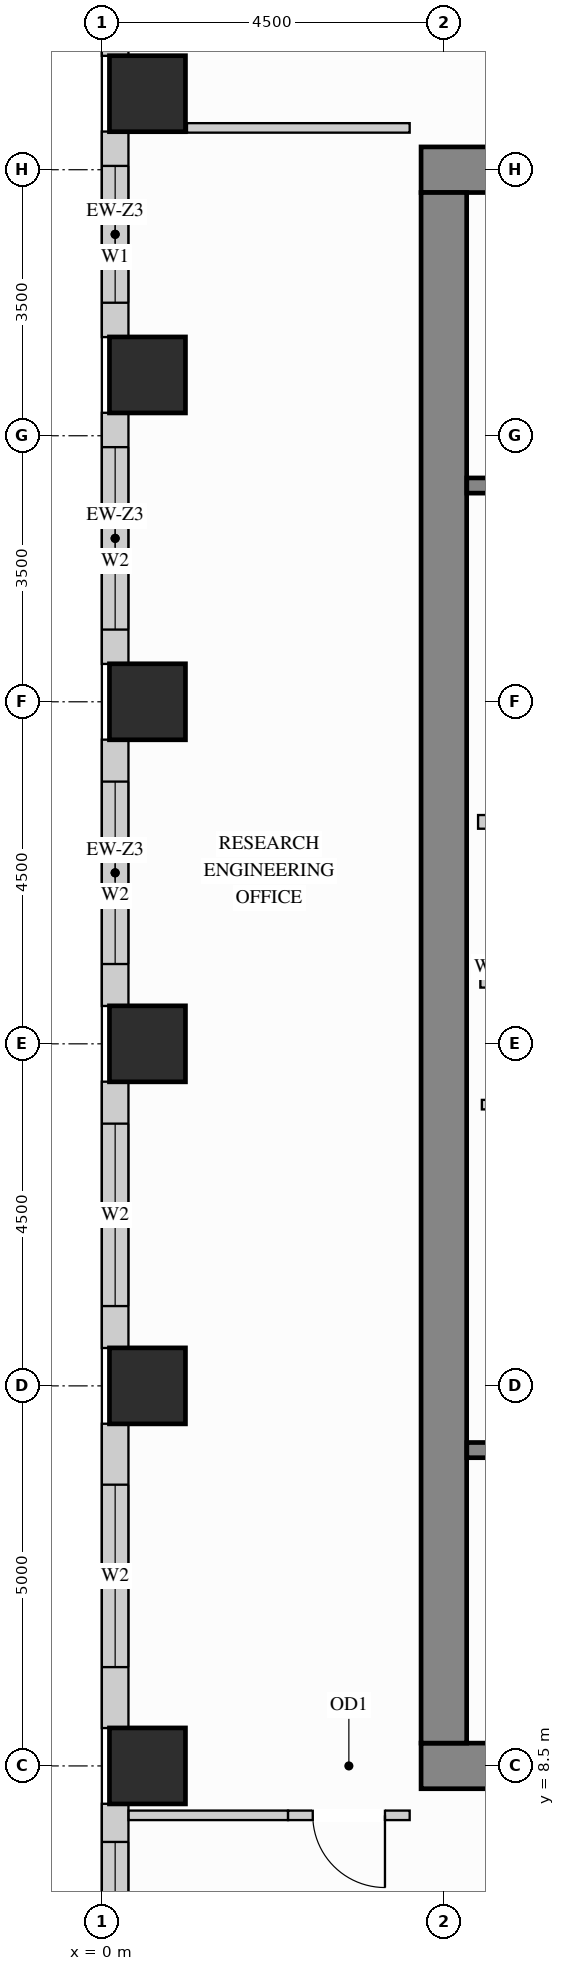
"""IFC4 building model, lengths in metres.
Left out: names, types, materials, properties, quantities, classifications, styles, units other than length and angle.
Written with IfcOpenShell. Run it as: python <this file> out.ifc"""

import sys

from ifc_helpers import new_model, si_unit, direction, frame, frame_2d, origin, origin_2d, place, context, subcontext, project, spatial, rectangle, extrude, source, transform, mapped, element, fill, save


model = new_model("IFC4")
c1 = context("Model", 3, precision=1e-05, world=origin(), true_north=direction((0.0, 1.0)))
c2 = subcontext(c1, "Body", "Model", "MODEL_VIEW")
j1 = project(units=[si_unit("LENGTHUNIT", "METRE"), si_unit("PLANEANGLEUNIT", "RADIAN")], contexts=[c1])
p1 = place(None, origin())
s1 = spatial("IfcSite", under=j1, at=p1, CompositionType="ELEMENT")
p2 = place(p1, origin())
s2 = spatial("IfcBuilding", under=s1, at=p2, CompositionType="ELEMENT")
p3 = place(p2, frame((0.0, 0.0, 186.3)))
s3 = spatial("IfcBuildingStorey", under=s2, at=p3, CompositionType="ELEMENT", Elevation=186.3)
m1 = source(origin(), c2, "Body", "SweptSolid", [
    extrude(rectangle(XDim=1.0, YDim=1.0, at=origin_2d()), origin(), (0.0, 0.0, 1.0), 3.4),
])
for number, where, z_axis, x_axis in (
    (1, (0.6, 13.5, 0.0), (0.0, 0.0, 1.0), (1.0, 0.0, 0.0)),
    (2, (0.6, 18.0, 0.0), (0.0, 0.0, 1.0), (1.0, 0.0, 0.0)),
    (3, (0.6, 22.5, 0.0), (0.0, 0.0, 1.0), (1.0, 0.0, 0.0)),
    (4, (0.6, 26.8, 0.0), (0.0, 0.0, 1.0), (1.0, 0.0, 0.0)),
    (5, (0.6, 30.5, 0.0), (0.0, 0.0, 1.0), (1.0, 0.0, 0.0)),
    (6, (0.6, 8.5, 0.0), (0.0, 0.0, 1.0), (1.0, 0.0, 0.0)),
):
    element("IfcColumn", number, at=place(p3, frame(where, z_axis=z_axis, x_axis=x_axis)), inside=s3, PredefinedType="COLUMN", context=c2, shape_type="MappedRepresentation", body=[
        mapped(m1, transform((0.0, 0.0, 0.0), x_axis=(1.0, 0.0, 0.0), y_axis=(0.0, 1.0, 0.0), z_axis=(0.0, 0.0, 1.0))),
    ])
m2 = source(origin(), c2, "Body", "SweptSolid", [
    extrude(rectangle(XDim=10.6, YDim=0.6, at=frame_2d((5.3, 0.0))), origin(), (0.0, 0.0, 1.0), 3.4),
])
for number, where, z_axis, x_axis in (
    (7, (4.2, 29.5, 0.0), (0.0, 0.0, 1.0), (1.0, 0.0, 0.0)),
    (8, (4.2, 8.5, 0.0), (0.0, 0.0, 1.0), (1.0, 0.0, 0.0)),
):
    element("IfcWall", number, at=place(p3, frame(where, z_axis=z_axis, x_axis=x_axis)), inside=s3, PredefinedType="SHEAR", context=c2, shape_type="MappedRepresentation", body=[
        mapped(m2, transform((0.0, 0.0, 0.0), x_axis=(1.0, 0.0, 0.0), y_axis=(0.0, 1.0, 0.0), z_axis=(0.0, 0.0, 1.0))),
    ])
m3 = source(origin(), c2, "Body", "SweptSolid", [
    extrude(rectangle(XDim=20.4, YDim=0.6, at=frame_2d((10.2, 0.0))), origin(), (0.0, 0.0, 1.0), 3.4),
])
p4 = place(p3, frame((4.5, 8.8, 0.0), z_axis=(0.0, 0.0, 1.0), x_axis=(0.0, 1.0, 0.0)))
e9 = element("IfcWall", 9, at=p4, inside=s3, PredefinedType="SHEAR", context=c2, shape_type="MappedRepresentation", body=[
    mapped(m3, transform((0.0, 0.0, 0.0), x_axis=(1.0, 0.0, 0.0), y_axis=(0.0, 1.0, 0.0), z_axis=(0.0, 0.0, 1.0))),
])
p5 = place(p3, frame((0.175, 34.502, 0.0), z_axis=(0.0, 0.0, 1.0), x_axis=(0.0, -1.0, 0.0)))
e10 = element("IfcWall", 10, at=p5, inside=s3, PredefinedType="SOLIDWALL", context=c2, shape_type="SweptSolid", body=[
    extrude(rectangle(XDim=3.504, YDim=0.35, at=frame_2d((1.752, 0.0))), origin(), (0.0, 0.0, 1.0), 2.612),
])
p6 = place(p5, frame((0.511, 0.0, 0.78)))
e11 = element("IfcOpeningElement", 11, at=p6, cuts=e10, PredefinedType="OPENING", context=c2, shape_type="SweptSolid", body=[
    extrude(rectangle(XDim=1.2, YDim=1.652, at=frame_2d((0.6, 0.826))), frame((0.0, 0.185, 0.0), z_axis=(0.0, -1.0, 0.0), x_axis=(1.0, 0.0, 0.0)), (0.0, 0.0, 1.0), 0.37),
])
p7 = place(p3, frame((0.175, 30.002, 0.0), z_axis=(0.0, 0.0, 1.0), x_axis=(0.0, -1.0, 0.0)))
e12 = element("IfcWall", 12, at=p7, inside=s3, PredefinedType="SOLIDWALL", context=c2, shape_type="SweptSolid", body=[
    extrude(rectangle(XDim=2.704, YDim=0.35, at=frame_2d((1.352, 0.0))), origin(), (0.0, 0.0, 1.0), 2.612),
])
p8 = place(p7, frame((0.452, 0.0, 0.78)))
e13 = element("IfcOpeningElement", 13, at=p8, cuts=e12, PredefinedType="OPENING", context=c2, shape_type="SweptSolid", body=[
    extrude(rectangle(XDim=1.8, YDim=1.652, at=frame_2d((0.9, 0.826))), frame((0.0, 0.185, 0.0), z_axis=(0.0, -1.0, 0.0), x_axis=(1.0, 0.0, 0.0)), (0.0, 0.0, 1.0), 0.37),
])
p9 = place(p3, frame((0.175, 26.302, 0.0), z_axis=(0.0, 0.0, 1.0), x_axis=(0.0, -1.0, 0.0)))
e14 = element("IfcWall", 14, at=p9, inside=s3, PredefinedType="SOLIDWALL", context=c2, shape_type="SweptSolid", body=[
    extrude(rectangle(XDim=3.304, YDim=0.35, at=frame_2d((1.652, 0.0))), origin(), (0.0, 0.0, 1.0), 2.612),
])
p10 = place(p9, frame((0.452, 0.0, 0.78)))
e15 = element("IfcOpeningElement", 15, at=p10, cuts=e14, PredefinedType="OPENING", context=c2, shape_type="SweptSolid", body=[
    extrude(rectangle(XDim=2.4, YDim=1.652, at=frame_2d((1.2, 0.826))), frame((0.0, 0.185, 0.0), z_axis=(0.0, -1.0, 0.0), x_axis=(1.0, 0.0, 0.0)), (0.0, 0.0, 1.0), 0.37),
])
p11 = place(p3, frame((0.175, 22.002, 0.0), z_axis=(0.0, 0.0, 1.0), x_axis=(0.0, -1.0, 0.0)))
e16 = element("IfcWall", 16, at=p11, inside=s3, PredefinedType="SOLIDWALL", context=c2, shape_type="SweptSolid", body=[
    extrude(rectangle(XDim=3.504, YDim=0.35, at=frame_2d((1.752, 0.0))), origin(), (0.0, 0.0, 1.0), 2.612),
])
p12 = place(p11, frame((0.552, 0.0, 0.78)))
e17 = element("IfcOpeningElement", 17, at=p12, cuts=e16, PredefinedType="OPENING", context=c2, shape_type="SweptSolid", body=[
    extrude(rectangle(XDim=2.4, YDim=1.652, at=frame_2d((1.2, 0.826))), frame((0.0, 0.185, 0.0), z_axis=(0.0, -1.0, 0.0), x_axis=(1.0, 0.0, 0.0)), (0.0, 0.0, 1.0), 0.37),
])
p13 = place(p3, frame((0.175, 17.502, 0.0), z_axis=(0.0, 0.0, 1.0), x_axis=(0.0, -1.0, 0.0)))
e18 = element("IfcWall", 18, at=p13, inside=s3, PredefinedType="SOLIDWALL", context=c2, shape_type="SweptSolid", body=[
    extrude(rectangle(XDim=3.504, YDim=0.35, at=frame_2d((1.752, 0.0))), origin(), (0.0, 0.0, 1.0), 2.612),
])
p14 = place(p13, frame((0.552, 0.0, 0.78)))
e19 = element("IfcOpeningElement", 19, at=p14, cuts=e18, PredefinedType="OPENING", context=c2, shape_type="SweptSolid", body=[
    extrude(rectangle(XDim=2.4, YDim=1.652, at=frame_2d((1.2, 0.826))), frame((0.0, 0.185, 0.0), z_axis=(0.0, -1.0, 0.0), x_axis=(1.0, 0.0, 0.0)), (0.0, 0.0, 1.0), 0.37),
])
p15 = place(p3, frame((0.175, 13.002, 0.0), z_axis=(0.0, 0.0, 1.0), x_axis=(0.0, -1.0, 0.0)))
e20 = element("IfcWall", 20, at=p15, inside=s3, PredefinedType="SOLIDWALL", context=c2, shape_type="SweptSolid", body=[
    extrude(rectangle(XDim=4.004, YDim=0.35, at=frame_2d((2.002, 0.0))), origin(), (0.0, 0.0, 1.0), 2.612),
])
p16 = place(p15, frame((0.802, 0.0, 0.78)))
e21 = element("IfcOpeningElement", 21, at=p16, cuts=e20, PredefinedType="OPENING", context=c2, shape_type="SweptSolid", body=[
    extrude(rectangle(XDim=2.4, YDim=1.652, at=frame_2d((1.2, 0.826))), frame((0.0, 0.185, 0.0), z_axis=(0.0, -1.0, 0.0), x_axis=(1.0, 0.0, 0.0)), (0.0, 0.0, 1.0), 0.37),
])
p17 = place(p3, frame((0.175, 8.002, 0.0), z_axis=(0.0, 0.0, 1.0), x_axis=(0.0, -1.0, 0.0)))
e22 = element("IfcWall", 22, at=p17, inside=s3, PredefinedType="SOLIDWALL", context=c2, shape_type="SweptSolid", body=[
    extrude(rectangle(XDim=4.004, YDim=0.35, at=frame_2d((2.002, 0.0))), origin(), (0.0, 0.0, 1.0), 2.612),
])
p18 = place(p17, frame((0.502, 0.0, 0.78)))
e23 = element("IfcOpeningElement", 23, at=p18, cuts=e22, PredefinedType="OPENING", context=c2, shape_type="SweptSolid", body=[
    extrude(rectangle(XDim=1.8, YDim=1.652, at=frame_2d((0.9, 0.826))), frame((0.0, 0.185, 0.0), z_axis=(0.0, -1.0, 0.0), x_axis=(1.0, 0.0, 0.0)), (0.0, 0.0, 1.0), 0.37),
])
m4 = source(origin(), c2, "Body", "SweptSolid", [
    extrude(rectangle(XDim=2.2, YDim=0.18, at=frame_2d((1.1, 0.0))), origin(), (0.0, 0.0, 1.0), 3.385),
])
p19 = place(p3, frame((4.95, 20.92, 0.0), z_axis=(0.0, 0.0, 1.0), x_axis=(1.0, 0.0, 0.0)))
e24 = element("IfcWall", 24, at=p19, inside=s3, PredefinedType="PARTITIONING", context=c2, shape_type="MappedRepresentation", body=[
    mapped(m4, transform((0.0, 0.0, 0.0), x_axis=(1.0, 0.0, 0.0), y_axis=(0.0, 1.0, 0.0), z_axis=(0.0, 0.0, 1.0))),
])
p20 = place(p3, frame((5.0, 17.2, 0.0), z_axis=(0.0, 0.0, 1.0), x_axis=(1.0, 0.0, 0.0)))
e25 = element("IfcWall", 25, at=p20, inside=s3, PredefinedType="PARTITIONING", context=c2, shape_type="SweptSolid", body=[
    extrude(rectangle(XDim=2.4, YDim=0.125, at=frame_2d((1.2, 0.0))), origin(), (0.0, 0.0, 1.0), 3.385),
])
p21 = place(p20, frame((0.7, 0.0, 0.0)))
e26 = element("IfcOpeningElement", 26, at=p21, cuts=e25, PredefinedType="OPENING", context=c2, shape_type="SweptSolid", body=[
    extrude(rectangle(XDim=0.85, YDim=2.1, at=frame_2d((0.425, 1.05))), frame((0.0, 0.073, 0.0), z_axis=(0.0, -1.0, 0.0), x_axis=(1.0, 0.0, 0.0)), (0.0, 0.0, 1.0), 0.145),
])
m5 = source(origin(), c2, "Body", "SweptSolid", [
    extrude(rectangle(XDim=2.93, YDim=0.125, at=frame_2d((1.465, 0.0))), origin(), (0.0, 0.0, 1.0), 3.385),
])
p22 = place(p3, frame((1.12, 30.05, 0.0), z_axis=(0.0, 0.0, 1.0), x_axis=(1.0, 0.0, 0.0)))
e27 = element("IfcWall", 27, at=p22, inside=s3, PredefinedType="PARTITIONING", context=c2, shape_type="MappedRepresentation", body=[
    mapped(m5, transform((0.0, 0.0, 0.0), x_axis=(1.0, 0.0, 0.0), y_axis=(0.0, 1.0, 0.0), z_axis=(0.0, 0.0, 1.0))),
])
m6 = source(origin(), c2, "Body", "SweptSolid", [
    extrude(rectangle(XDim=2.098, YDim=0.125, at=frame_2d((1.049, 0.0))), origin(), (0.0, 0.0, 1.0), 3.385),
])
p23 = place(p3, frame((0.352, 7.85, 0.0), z_axis=(0.0, 0.0, 1.0), x_axis=(1.0, 0.0, 0.0)))
e28 = element("IfcWall", 28, at=p23, inside=s3, PredefinedType="PARTITIONING", context=c2, shape_type="MappedRepresentation", body=[
    mapped(m6, transform((0.0, 0.0, 0.0), x_axis=(1.0, 0.0, 0.0), y_axis=(0.0, 1.0, 0.0), z_axis=(0.0, 0.0, 1.0))),
])
p24 = place(p3, frame((2.45, 7.85, 0.0), z_axis=(0.0, 0.0, 1.0), x_axis=(1.0, 0.0, 0.0)))
e29 = element("IfcWall", 29, at=p24, inside=s3, PredefinedType="PARTITIONING", context=c2, shape_type="SweptSolid", body=[
    extrude(rectangle(XDim=1.6, YDim=0.125, at=frame_2d((0.8, 0.0))), origin(), (0.0, 0.0, 1.0), 3.385),
])
p25 = place(p24, frame((0.325, 0.0, 0.0)))
e30 = element("IfcOpeningElement", 30, at=p25, cuts=e29, PredefinedType="OPENING", context=c2, shape_type="SweptSolid", body=[
    extrude(rectangle(XDim=0.95, YDim=2.15, at=frame_2d((0.475, 1.075))), frame((0.0, 0.073, 0.0), z_axis=(0.0, -1.0, 0.0), x_axis=(1.0, 0.0, 0.0)), (0.0, 0.0, 1.0), 0.145),
])
m7 = source(origin(), c2, "Body", "SweptSolid", [
    extrude(rectangle(XDim=2.09, YDim=0.2, at=frame_2d((1.045, 0.0))), origin(), (0.0, 0.0, 1.0), 3.385),
])
p26 = place(p3, frame((4.98, 18.84, 0.0), z_axis=(0.0, 0.0, 1.0), x_axis=(1.0, 0.0, 0.0)))
e31 = element("IfcWall", 31, at=p26, inside=s3, PredefinedType="PARTITIONING", context=c2, shape_type="MappedRepresentation", body=[
    mapped(m7, transform((0.0, 0.0, 0.0), x_axis=(1.0, 0.0, 0.0), y_axis=(0.0, 1.0, 0.0), z_axis=(0.0, 0.0, 1.0))),
])
p27 = place(p3, frame((4.802, 12.655, 0.0), z_axis=(0.0, 0.0, 1.0), x_axis=(1.0, 0.0, 0.0)))
e32 = element("IfcWall", 32, at=p27, inside=s3, PredefinedType="SHEAR", context=c2, shape_type="SweptSolid", body=[
    extrude(rectangle(XDim=7.603, YDim=0.2, at=frame_2d((3.802, 0.0))), origin(), (0.0, 0.0, 1.0), 3.4),
])
p28 = place(p27, frame((0.4, 0.0, 0.0)))
e33 = element("IfcOpeningElement", 33, at=p28, cuts=e32, PredefinedType="OPENING", context=c2, shape_type="SweptSolid", body=[
    extrude(rectangle(XDim=1.1, YDim=2.15, at=frame_2d((0.55, 1.075))), frame((0.0, 0.11, 0.0), z_axis=(0.0, -1.0, 0.0), x_axis=(1.0, 0.0, 0.0)), (0.0, 0.0, 1.0), 0.22),
])
p29 = place(p3, frame((4.802, 25.345, 0.0), z_axis=(0.0, 0.0, 1.0), x_axis=(1.0, 0.0, 0.0)))
e34 = element("IfcWall", 34, at=p29, inside=s3, PredefinedType="SHEAR", context=c2, shape_type="SweptSolid", body=[
    extrude(rectangle(XDim=7.603, YDim=0.2, at=frame_2d((3.802, 0.0))), origin(), (0.0, 0.0, 1.0), 3.4),
])
p30 = place(p29, frame((0.4, 0.0, 0.0)))
e35 = element("IfcOpeningElement", 35, at=p30, cuts=e34, PredefinedType="OPENING", context=c2, shape_type="SweptSolid", body=[
    extrude(rectangle(XDim=1.1, YDim=2.15, at=frame_2d((0.55, 1.075))), frame((0.0, 0.11, 0.0), z_axis=(0.0, -1.0, 0.0), x_axis=(1.0, 0.0, 0.0)), (0.0, 0.0, 1.0), 0.22),
])
m8 = source(origin(), c2, "Body", "SweptSolid", [
    extrude(rectangle(XDim=0.95, YDim=2.15, at=frame_2d((0.475, 1.075))), frame((0.0, 0.025, 0.0), z_axis=(0.0, -1.0, 0.0), x_axis=(1.0, 0.0, 0.0)), (0.0, 0.0, 1.0), 0.05),
])
p31 = place(p25, origin())
e36 = element("IfcDoor", 36, at=p31, inside=s3, OperationType="SINGLE_SWING_RIGHT", PredefinedType="DOOR", context=c2, shape_type="MappedRepresentation", body=[
    mapped(m8, transform((0.0, 0.0, 0.0), x_axis=(1.0, 0.0, 0.0), y_axis=(0.0, 1.0, 0.0), z_axis=(0.0, 0.0, 1.0))),
])
fill(e30, e36)
m9 = source(origin(), c2, "Body", "SweptSolid", [
    extrude(rectangle(XDim=1.8, YDim=1.652, at=frame_2d((0.9, 0.826))), frame((0.0, 0.03, 0.0), z_axis=(0.0, -1.0, 0.0), x_axis=(1.0, 0.0, 0.0)), (0.0, 0.0, 1.0), 0.06),
])
p32 = place(p8, origin())
e37 = element("IfcWindow", 37, at=p32, inside=s3, PartitioningType="SINGLE_PANEL", PredefinedType="WINDOW", context=c2, shape_type="MappedRepresentation", body=[
    mapped(m9, transform((0.0, 0.0, 0.0), x_axis=(1.0, 0.0, 0.0), y_axis=(0.0, 1.0, 0.0), z_axis=(0.0, 0.0, 1.0))),
])
fill(e13, e37)
p33 = place(p18, origin())
e38 = element("IfcWindow", 38, at=p33, inside=s3, PartitioningType="SINGLE_PANEL", PredefinedType="WINDOW", context=c2, shape_type="MappedRepresentation", body=[
    mapped(m9, transform((0.0, 0.0, 0.0), x_axis=(1.0, 0.0, 0.0), y_axis=(0.0, 1.0, 0.0), z_axis=(0.0, 0.0, 1.0))),
])
fill(e23, e38)
m10 = source(origin(), c2, "Body", "SweptSolid", [
    extrude(rectangle(XDim=2.4, YDim=1.652, at=frame_2d((1.2, 0.826))), frame((0.0, 0.03, 0.0), z_axis=(0.0, -1.0, 0.0), x_axis=(1.0, 0.0, 0.0)), (0.0, 0.0, 1.0), 0.06),
])
p34 = place(p10, origin())
e39 = element("IfcWindow", 39, at=p34, inside=s3, PartitioningType="SINGLE_PANEL", PredefinedType="WINDOW", context=c2, shape_type="MappedRepresentation", body=[
    mapped(m10, transform((0.0, 0.0, 0.0), x_axis=(1.0, 0.0, 0.0), y_axis=(0.0, 1.0, 0.0), z_axis=(0.0, 0.0, 1.0))),
])
fill(e15, e39)
p35 = place(p12, origin())
e40 = element("IfcWindow", 40, at=p35, inside=s3, PartitioningType="SINGLE_PANEL", PredefinedType="WINDOW", context=c2, shape_type="MappedRepresentation", body=[
    mapped(m10, transform((0.0, 0.0, 0.0), x_axis=(1.0, 0.0, 0.0), y_axis=(0.0, 1.0, 0.0), z_axis=(0.0, 0.0, 1.0))),
])
fill(e17, e40)
p36 = place(p14, origin())
e41 = element("IfcWindow", 41, at=p36, inside=s3, PartitioningType="SINGLE_PANEL", PredefinedType="WINDOW", context=c2, shape_type="MappedRepresentation", body=[
    mapped(m10, transform((0.0, 0.0, 0.0), x_axis=(1.0, 0.0, 0.0), y_axis=(0.0, 1.0, 0.0), z_axis=(0.0, 0.0, 1.0))),
])
fill(e19, e41)
p37 = place(p16, origin())
e42 = element("IfcWindow", 42, at=p37, inside=s3, PartitioningType="SINGLE_PANEL", PredefinedType="WINDOW", context=c2, shape_type="MappedRepresentation", body=[
    mapped(m10, transform((0.0, 0.0, 0.0), x_axis=(1.0, 0.0, 0.0), y_axis=(0.0, 1.0, 0.0), z_axis=(0.0, 0.0, 1.0))),
])
fill(e21, e42)
save(model, sys.argv[1])
